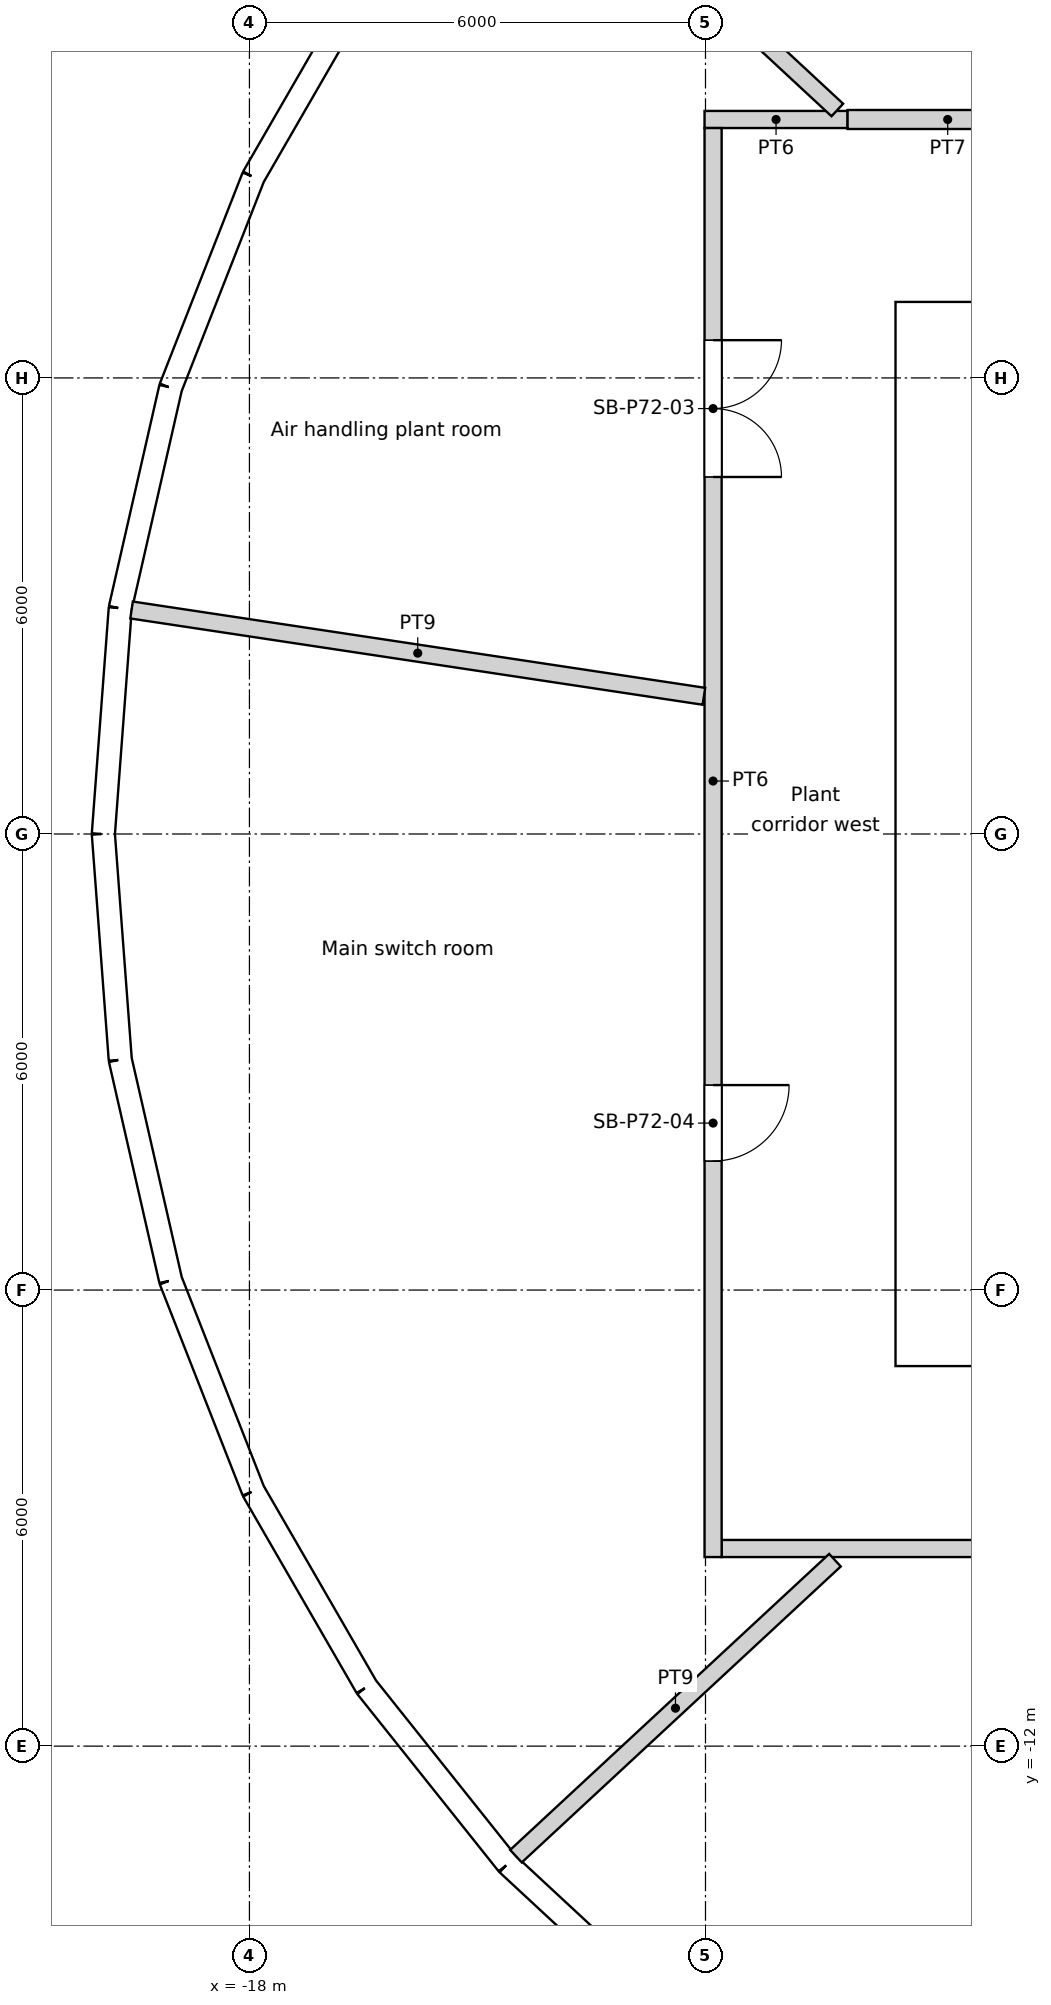
"""IFC4 building model, lengths in metres.
Left out: names, types, materials, properties, quantities, classifications, styles, units other than length and angle.
Written with IfcOpenShell. Run it as: python <this file> out.ifc"""

import sys

from ifc_helpers import new_model, si_unit, direction, frame, frame_2d, origin, origin_2d, place, context, subcontext, project, spatial, rectangle, circle, extrude, element, fill, save


model = new_model("IFC4")
c1 = context("Model", 3, precision=1e-05, world=origin(), true_north=direction((0.0, 1.0)))
c2 = subcontext(c1, "Body", "Model", "MODEL_VIEW")
j1 = project(units=[si_unit("LENGTHUNIT", "METRE"), si_unit("PLANEANGLEUNIT", "RADIAN")], contexts=[c1])
p1 = place(None, origin())
s1 = spatial("IfcSite", under=j1, at=p1, CompositionType="ELEMENT")
p2 = place(p1, origin())
s2 = spatial("IfcBuilding", under=s1, at=p2, CompositionType="ELEMENT")
p3 = place(p2, frame((0.0, 0.0, 277.8)))
s3 = spatial("IfcBuildingStorey", under=s2, at=p3, CompositionType="ELEMENT", Elevation=277.8)
for number, where, z_axis, x_axis in (
    (1, (-16.958, 8.167, 0.0), (0.0, 0.0, 1.0), (1.0, 0.0, 0.0)),
    (2, (-18.612, 2.805, 0.0), (0.0, 0.0, 1.0), (1.0, 0.0, 0.0)),
    (3, (-18.612, -2.805, 0.0), (0.0, 0.0, 1.0), (1.0, 0.0, 0.0)),
    (4, (-16.958, -8.167, 0.0), (0.0, 0.0, 1.0), (1.0, 0.0, 0.0)),
    (5, (-13.798, -12.802, 0.0), (0.0, 0.0, 1.0), (1.0, 0.0, 0.0)),
):
    element("IfcColumn", number, at=place(p3, frame(where, z_axis=z_axis, x_axis=x_axis)), inside=s3, PredefinedType="COLUMN", context=c2, shape_type="SweptSolid", body=[
        extrude(circle(Radius=0.55, at=origin_2d()), origin(), (0.0, 0.0, 1.0), 6.0),
    ])
p4 = place(p3, frame((-16.46, 11.222, 0.0), z_axis=(0.0, 0.0, 1.0), x_axis=(-0.500001626982, -0.866024464444, 0.0)))
e6 = element("IfcWall", 6, at=p4, inside=s3, PredefinedType="SOLIDWALL", context=c2, shape_type="SweptSolid", body=[
    extrude(rectangle(XDim=2.978, YDim=0.3, at=frame_2d((1.489, 0.0))), origin(), (0.0, 0.0, 1.0), 5.65),
])
p5 = place(p4, frame((1.489, 0.0, 1.825)))
e7 = element("IfcOpeningElement", 7, at=p5, cuts=e6, PredefinedType="OPENING", context=c2, shape_type="SweptSolid", body=[
    extrude(circle(Radius=1.2, at=origin_2d()), frame((0.0, 0.16, 0.0), z_axis=(0.0, -1.0, 0.0), x_axis=(1.0, 0.0, 0.0)), (0.0, 0.0, 1.0), 0.32),
])
p6 = place(p3, frame((-17.949, 8.644, 0.0), z_axis=(0.0, 0.0, 1.0), x_axis=(-0.365289571566, -0.930893940739, 0.0)))
e8 = element("IfcWall", 8, at=p6, inside=s3, PredefinedType="SOLIDWALL", context=c2, shape_type="SweptSolid", body=[
    extrude(rectangle(XDim=2.978, YDim=0.3, at=frame_2d((1.489, 0.0))), origin(), (0.0, 0.0, 1.0), 5.65),
])
p7 = place(p6, frame((1.489, 0.0, 1.825)))
e9 = element("IfcOpeningElement", 9, at=p7, cuts=e8, PredefinedType="OPENING", context=c2, shape_type="SweptSolid", body=[
    extrude(circle(Radius=1.2, at=origin_2d()), frame((0.0, 0.16, 0.0), z_axis=(0.0, -1.0, 0.0), x_axis=(1.0, 0.0, 0.0)), (0.0, 0.0, 1.0), 0.32),
])
p8 = place(p3, frame((-19.037, 5.872, 0.0), z_axis=(0.0, 0.0, 1.0), x_axis=(-0.222535358937, -0.974924619662, 0.0)))
e10 = element("IfcWall", 10, at=p8, inside=s3, PredefinedType="SOLIDWALL", context=c2, shape_type="SweptSolid", body=[
    extrude(rectangle(XDim=2.978, YDim=0.3, at=frame_2d((1.489, 0.0))), origin(), (0.0, 0.0, 1.0), 5.2),
])
p9 = place(p8, frame((1.489, 0.0, 1.825)))
e11 = element("IfcOpeningElement", 11, at=p9, cuts=e10, PredefinedType="OPENING", context=c2, shape_type="SweptSolid", body=[
    extrude(circle(Radius=1.2, at=origin_2d()), frame((0.0, 0.16, 0.0), z_axis=(0.0, -1.0, 0.0), x_axis=(1.0, 0.0, 0.0)), (0.0, 0.0, 1.0), 0.32),
])
p10 = place(p3, frame((-19.699, 2.969, 0.0), z_axis=(0.0, 0.0, 1.0), x_axis=(-0.074777718064, -0.997200227076, 0.0)))
e12 = element("IfcWall", 12, at=p10, inside=s3, PredefinedType="SOLIDWALL", context=c2, shape_type="SweptSolid", body=[
    extrude(rectangle(XDim=2.978, YDim=0.3, at=frame_2d((1.489, 0.0))), origin(), (0.0, 0.0, 1.0), 5.65),
])
p11 = place(p10, frame((1.489, 0.0, 1.825)))
e13 = element("IfcOpeningElement", 13, at=p11, cuts=e12, PredefinedType="OPENING", context=c2, shape_type="SweptSolid", body=[
    extrude(circle(Radius=1.2, at=origin_2d()), frame((0.0, 0.16, 0.0), z_axis=(0.0, -1.0, 0.0), x_axis=(1.0, 0.0, 0.0)), (0.0, 0.0, 1.0), 0.32),
])
p12 = place(p3, frame((-19.922, 0.0, 0.0), z_axis=(0.0, 0.0, 1.0), x_axis=(0.074777718064, -0.997200227076, 0.0)))
e14 = element("IfcWall", 14, at=p12, inside=s3, PredefinedType="SOLIDWALL", context=c2, shape_type="SweptSolid", body=[
    extrude(rectangle(XDim=2.978, YDim=0.3, at=frame_2d((1.489, 0.0))), origin(), (0.0, 0.0, 1.0), 5.65),
])
p13 = place(p12, frame((1.489, 0.0, 1.825)))
e15 = element("IfcOpeningElement", 15, at=p13, cuts=e14, PredefinedType="OPENING", context=c2, shape_type="SweptSolid", body=[
    extrude(circle(Radius=1.2, at=origin_2d()), frame((0.0, 0.16, 0.0), z_axis=(0.0, -1.0, 0.0), x_axis=(1.0, 0.0, 0.0)), (0.0, 0.0, 1.0), 0.32),
])
p14 = place(p3, frame((-19.699, -2.969, 0.0), z_axis=(0.0, 0.0, 1.0), x_axis=(0.222535358937, -0.974924619662, 0.0)))
e16 = element("IfcWall", 16, at=p14, inside=s3, PredefinedType="SOLIDWALL", context=c2, shape_type="SweptSolid", body=[
    extrude(rectangle(XDim=2.978, YDim=0.3, at=frame_2d((1.489, 0.0))), origin(), (0.0, 0.0, 1.0), 5.2),
])
p15 = place(p14, frame((1.489, 0.0, 1.825)))
e17 = element("IfcOpeningElement", 17, at=p15, cuts=e16, PredefinedType="OPENING", context=c2, shape_type="SweptSolid", body=[
    extrude(circle(Radius=1.2, at=origin_2d()), frame((0.0, 0.16, 0.0), z_axis=(0.0, -1.0, 0.0), x_axis=(1.0, 0.0, 0.0)), (0.0, 0.0, 1.0), 0.32),
])
p16 = place(p3, frame((-19.037, -5.872, 0.0), z_axis=(0.0, 0.0, 1.0), x_axis=(0.365289571566, -0.930893940739, 0.0)))
e18 = element("IfcWall", 18, at=p16, inside=s3, PredefinedType="SOLIDWALL", context=c2, shape_type="SweptSolid", body=[
    extrude(rectangle(XDim=2.978, YDim=0.3, at=frame_2d((1.489, 0.0))), origin(), (0.0, 0.0, 1.0), 5.65),
])
p17 = place(p16, frame((1.489, 0.0, 1.825)))
e19 = element("IfcOpeningElement", 19, at=p17, cuts=e18, PredefinedType="OPENING", context=c2, shape_type="SweptSolid", body=[
    extrude(circle(Radius=1.2, at=origin_2d()), frame((0.0, 0.16, 0.0), z_axis=(0.0, -1.0, 0.0), x_axis=(1.0, 0.0, 0.0)), (0.0, 0.0, 1.0), 0.32),
])
p18 = place(p3, frame((-17.949, -8.644, 0.0), z_axis=(0.0, 0.0, 1.0), x_axis=(0.500001626982, -0.866024464444, 0.0)))
e20 = element("IfcWall", 20, at=p18, inside=s3, PredefinedType="SOLIDWALL", context=c2, shape_type="SweptSolid", body=[
    extrude(rectangle(XDim=2.978, YDim=0.3, at=frame_2d((1.489, 0.0))), origin(), (0.0, 0.0, 1.0), 5.65),
])
p19 = place(p18, frame((1.489, 0.0, 1.825)))
e21 = element("IfcOpeningElement", 21, at=p19, cuts=e20, PredefinedType="OPENING", context=c2, shape_type="SweptSolid", body=[
    extrude(circle(Radius=1.2, at=origin_2d()), frame((0.0, 0.16, 0.0), z_axis=(0.0, -1.0, 0.0), x_axis=(1.0, 0.0, 0.0)), (0.0, 0.0, 1.0), 0.32),
])
p20 = place(p3, frame((-16.46, -11.222, 0.0), z_axis=(0.0, 0.0, 1.0), x_axis=(0.623494374707, -0.781827835722, 0.0)))
e22 = element("IfcWall", 22, at=p20, inside=s3, PredefinedType="SOLIDWALL", context=c2, shape_type="SweptSolid", body=[
    extrude(rectangle(XDim=2.978, YDim=0.3, at=frame_2d((1.489, 0.0))), origin(), (0.0, 0.0, 1.0), 5.2),
])
p21 = place(p20, frame((1.489, 0.0, 1.825)))
e23 = element("IfcOpeningElement", 23, at=p21, cuts=e22, PredefinedType="OPENING", context=c2, shape_type="SweptSolid", body=[
    extrude(circle(Radius=1.2, at=origin_2d()), frame((0.0, 0.16, 0.0), z_axis=(0.0, -1.0, 0.0), x_axis=(1.0, 0.0, 0.0)), (0.0, 0.0, 1.0), 0.32),
])
p22 = place(p3, frame((-14.604, -13.55, 0.0), z_axis=(0.0, 0.0, 1.0), x_axis=(0.733056277766, -0.68016798927, 0.0)))
e24 = element("IfcWall", 24, at=p22, inside=s3, PredefinedType="SOLIDWALL", context=c2, shape_type="SweptSolid", body=[
    extrude(rectangle(XDim=2.978, YDim=0.3, at=frame_2d((1.489, 0.0))), origin(), (0.0, 0.0, 1.0), 5.65),
])
p23 = place(p22, frame((1.489, 0.0, 1.825)))
e25 = element("IfcOpeningElement", 25, at=p23, cuts=e24, PredefinedType="OPENING", context=c2, shape_type="SweptSolid", body=[
    extrude(circle(Radius=1.2, at=origin_2d()), frame((0.0, 0.16, 0.0), z_axis=(0.0, -1.0, 0.0), x_axis=(1.0, 0.0, 0.0)), (0.0, 0.0, 1.0), 0.32),
])
p24 = place(p3, frame((-9.5, -6.7, 0.0), z_axis=(0.0, 0.0, 1.0), x_axis=(1.0, 0.0, 0.0)))
e26 = element("IfcWall", 26, at=p24, inside=s3, PredefinedType="SOLIDWALL", context=c2, shape_type="SweptSolid", body=[
    extrude(rectangle(XDim=19.0, YDim=0.6, at=frame_2d((9.5, 0.0))), origin(), (0.0, 0.0, 1.0), 6.0),
])
p25 = place(p24, frame((10.4, 0.0, 0.0)))
e27 = element("IfcOpeningElement", 27, at=p25, cuts=e26, PredefinedType="OPENING", context=c2, shape_type="SweptSolid", body=[
    extrude(rectangle(XDim=1.0, YDim=2.1, at=frame_2d((0.5, 1.05))), frame((0.0, 0.3, 0.0), z_axis=(0.0, -1.0, 0.0), x_axis=(1.0, 0.0, 0.0)), (0.0, 0.0, 1.0), 0.6),
])
p26 = place(p24, frame((5.35, 0.0, 0.0)))
e28 = element("IfcOpeningElement", 28, at=p26, cuts=e26, PredefinedType="OPENING", context=c2, shape_type="SweptSolid", body=[
    extrude(rectangle(XDim=1.7, YDim=2.1, at=frame_2d((0.85, 1.05))), frame((0.0, 0.3, 0.0), z_axis=(0.0, -1.0, 0.0), x_axis=(1.0, 0.0, 0.0)), (0.0, 0.0, 1.0), 0.6),
])
p27 = place(p24, frame((11.95, 0.0, 0.0)))
e29 = element("IfcOpeningElement", 29, at=p27, cuts=e26, PredefinedType="OPENING", context=c2, shape_type="SweptSolid", body=[
    extrude(rectangle(XDim=1.7, YDim=2.1, at=frame_2d((0.85, 1.05))), frame((0.0, 0.3, 0.0), z_axis=(0.0, -1.0, 0.0), x_axis=(1.0, 0.0, 0.0)), (0.0, 0.0, 1.0), 0.6),
])
p28 = place(p3, frame((-9.5, 6.7, 0.0), z_axis=(0.0, 0.0, 1.0), x_axis=(1.0, 0.0, 0.0)))
e30 = element("IfcWall", 30, at=p28, inside=s3, PredefinedType="SOLIDWALL", context=c2, shape_type="SweptSolid", body=[
    extrude(rectangle(XDim=19.0, YDim=0.6, at=frame_2d((9.5, 0.0))), origin(), (0.0, 0.0, 1.0), 6.0),
])
p29 = place(p28, frame((5.35, 0.0, 0.0)))
e31 = element("IfcOpeningElement", 31, at=p29, cuts=e30, PredefinedType="OPENING", context=c2, shape_type="SweptSolid", body=[
    extrude(rectangle(XDim=1.7, YDim=2.1, at=frame_2d((0.85, 1.05))), frame((0.0, 0.3, 0.0), z_axis=(0.0, -1.0, 0.0), x_axis=(1.0, 0.0, 0.0)), (0.0, 0.0, 1.0), 0.6),
])
p30 = place(p3, frame((-9.2, -6.4, 0.0), z_axis=(0.0, 0.0, 1.0), x_axis=(0.0, 1.0, 0.0)))
e32 = element("IfcWall", 32, at=p30, inside=s3, PredefinedType="SOLIDWALL", context=c2, shape_type="SweptSolid", body=[
    extrude(rectangle(XDim=12.8, YDim=0.6, at=frame_2d((6.4, 0.0))), origin(), (0.0, 0.0, 1.0), 6.0),
])
p31 = place(p3, frame((-8.9, -3.1, 0.0), z_axis=(0.0, 0.0, 1.0), x_axis=(1.0, 0.0, 0.0)))
e33 = element("IfcWall", 33, at=p31, inside=s3, PredefinedType="SOLIDWALL", context=c2, shape_type="SweptSolid", body=[
    extrude(rectangle(XDim=9.6, YDim=0.3, at=frame_2d((4.8, 0.0))), origin(), (0.0, 0.0, 1.0), 5.65),
])
p32 = place(p31, frame((4.75, 0.0, 0.0)))
e34 = element("IfcOpeningElement", 34, at=p32, cuts=e33, PredefinedType="OPENING", context=c2, shape_type="SweptSolid", body=[
    extrude(rectangle(XDim=1.7, YDim=2.1, at=frame_2d((0.85, 1.05))), frame((0.0, 0.15, 0.0), z_axis=(0.0, -1.0, 0.0), x_axis=(1.0, 0.0, 0.0)), (0.0, 0.0, 1.0), 0.3),
])
p33 = place(p3, frame((-8.9, 3.1, 0.0), z_axis=(0.0, 0.0, 1.0), x_axis=(1.0, 0.0, 0.0)))
e35 = element("IfcWall", 35, at=p33, inside=s3, PredefinedType="SOLIDWALL", context=c2, shape_type="SweptSolid", body=[
    extrude(rectangle(XDim=4.55, YDim=0.3, at=frame_2d((2.275, 0.0))), origin(), (0.0, 0.0, 1.0), 5.65),
])
p34 = place(p3, frame((-8.9, 0.0, 0.0), z_axis=(0.0, 0.0, 1.0), x_axis=(1.0, 0.0, 0.0)))
e36 = element("IfcWall", 36, at=p34, inside=s3, PredefinedType="SOLIDWALL", context=c2, shape_type="SweptSolid", body=[
    extrude(rectangle(XDim=3.0, YDim=0.3, at=frame_2d((1.5, 0.0))), origin(), (0.0, 0.0, 1.0), 5.65),
])
p35 = place(p3, frame((-19.551, 2.947, 0.0), z_axis=(0.0, 0.0, 1.0), x_axis=(0.988828618492, -0.14905691279, 0.0)))
e37 = element("IfcWall", 37, at=p35, inside=s3, PredefinedType="PARTITIONING", context=c2, shape_type="SweptSolid", body=[
    extrude(rectangle(XDim=7.615, YDim=0.225, at=frame_2d((3.807, 0.0))), origin(), (0.0, 0.0, 1.0), 2.7),
])
p36 = place(p3, frame((-14.493, -13.448, 0.0), z_axis=(0.0, 0.0, 1.0), x_axis=(0.733050106305, 0.680174640549, 0.0)))
e38 = element("IfcWall", 38, at=p36, inside=s3, PredefinedType="PARTITIONING", context=c2, shape_type="SweptSolid", body=[
    extrude(rectangle(XDim=5.725, YDim=0.225, at=frame_2d((2.863, 0.0))), origin(), (0.0, 0.0, 1.0), 2.7),
])
p37 = place(p3, frame((-14.493, 13.448, 0.0), z_axis=(0.0, 0.0, 1.0), x_axis=(0.733046716658, -0.680178293682, 0.0)))
e39 = element("IfcWall", 39, at=p37, inside=s3, PredefinedType="PARTITIONING", context=c2, shape_type="SweptSolid", body=[
    extrude(rectangle(XDim=5.768, YDim=0.225, at=frame_2d((2.884, 0.0))), origin(), (0.0, 0.0, 1.0), 2.7),
])
p38 = place(p3, frame((-11.788, -9.4, 0.0), z_axis=(0.0, 0.0, 1.0), x_axis=(1.0, 0.0, 0.0)))
e40 = element("IfcWall", 40, at=p38, inside=s3, PredefinedType="PARTITIONING", context=c2, shape_type="SweptSolid", body=[
    extrude(rectangle(XDim=23.575, YDim=0.225, at=frame_2d((11.788, 0.0))), origin(), (0.0, 0.0, 1.0), 5.65),
])
p39 = place(p38, frame((6.89, 0.0, 0.0)))
e41 = element("IfcOpeningElement", 41, at=p39, cuts=e40, PredefinedType="OPENING", context=c2, shape_type="SweptSolid", body=[
    extrude(rectangle(XDim=1.0, YDim=2.1, at=frame_2d((0.5, 1.05))), frame((0.0, 0.113, 0.0), z_axis=(0.0, -1.0, 0.0), x_axis=(1.0, 0.0, 0.0)), (0.0, 0.0, 1.0), 0.225),
])
p40 = place(p38, frame((15.388, 0.0, 0.0)))
e42 = element("IfcOpeningElement", 42, at=p40, cuts=e40, PredefinedType="OPENING", context=c2, shape_type="SweptSolid", body=[
    extrude(rectangle(XDim=1.0, YDim=2.1, at=frame_2d((0.5, 1.05))), frame((0.0, 0.113, 0.0), z_axis=(0.0, -1.0, 0.0), x_axis=(1.0, 0.0, 0.0)), (0.0, 0.0, 1.0), 0.225),
])
p41 = place(p3, frame((-11.9, 9.288, 0.0), z_axis=(0.0, 0.0, 1.0), x_axis=(0.0, -1.0, 0.0)))
e43 = element("IfcWall", 43, at=p41, inside=s3, PredefinedType="PARTITIONING", context=c2, shape_type="SweptSolid", body=[
    extrude(rectangle(XDim=18.8, YDim=0.225, at=frame_2d((9.4, 0.0))), origin(), (0.0, 0.0, 1.0), 5.65),
])
p42 = place(p41, frame((2.791, 0.0, 0.0)))
e44 = element("IfcOpeningElement", 44, at=p42, cuts=e43, PredefinedType="OPENING", context=c2, shape_type="SweptSolid", body=[
    extrude(rectangle(XDim=1.8, YDim=2.4, at=frame_2d((0.9, 1.2))), frame((0.0, 0.113, 0.0), z_axis=(0.0, -1.0, 0.0), x_axis=(1.0, 0.0, 0.0)), (0.0, 0.0, 1.0), 0.225),
])
p43 = place(p41, frame((12.591, 0.0, 0.0)))
e45 = element("IfcOpeningElement", 45, at=p43, cuts=e43, PredefinedType="OPENING", context=c2, shape_type="SweptSolid", body=[
    extrude(rectangle(XDim=1.0, YDim=2.1, at=frame_2d((0.5, 1.05))), frame((0.0, 0.113, 0.0), z_axis=(0.0, -1.0, 0.0), x_axis=(1.0, 0.0, 0.0)), (0.0, 0.0, 1.0), 0.225),
])
p44 = place(p3, frame((-10.131, 9.4, 0.0), z_axis=(0.0, 0.0, 1.0), x_axis=(-1.0, 0.0, 0.0)))
e46 = element("IfcWall", 46, at=p44, inside=s3, PredefinedType="PARTITIONING", context=c2, shape_type="SweptSolid", body=[
    extrude(rectangle(XDim=1.882, YDim=0.225, at=frame_2d((0.941, 0.0))), origin(), (0.0, 0.0, 1.0), 5.65),
])
p45 = place(p3, frame((-7.496, 9.4, 0.0), z_axis=(0.0, 0.0, 1.0), x_axis=(-1.0, 0.0, 0.0)))
e47 = element("IfcWall", 47, at=p45, inside=s3, PredefinedType="PARTITIONING", context=c2, shape_type="SweptSolid", body=[
    extrude(rectangle(XDim=2.635, YDim=0.25, at=frame_2d((1.317, 0.0))), origin(), (0.0, 0.0, 1.0), 5.65),
])
p46 = place(p5, origin())
e48 = element("IfcWindow", 48, at=p46, inside=s3, PartitioningType="SINGLE_PANEL", PredefinedType="WINDOW", context=c2, shape_type="SweptSolid", body=[
    extrude(circle(Radius=1.2, at=origin_2d()), frame((0.0, 0.12, 0.0), z_axis=(0.0, -1.0, 0.0), x_axis=(1.0, 0.0, 0.0)), (0.0, 0.0, 1.0), 0.1),
])
fill(e7, e48)
p47 = place(p7, origin())
e49 = element("IfcWindow", 49, at=p47, inside=s3, PartitioningType="SINGLE_PANEL", PredefinedType="WINDOW", context=c2, shape_type="SweptSolid", body=[
    extrude(circle(Radius=1.2, at=origin_2d()), frame((0.0, 0.12, 0.0), z_axis=(0.0, -1.0, 0.0), x_axis=(1.0, 0.0, 0.0)), (0.0, 0.0, 1.0), 0.1),
])
fill(e9, e49)
p48 = place(p9, origin())
e50 = element("IfcWindow", 50, at=p48, inside=s3, PartitioningType="SINGLE_PANEL", PredefinedType="WINDOW", context=c2, shape_type="SweptSolid", body=[
    extrude(circle(Radius=1.2, at=origin_2d()), frame((0.0, 0.12, 0.0), z_axis=(0.0, -1.0, 0.0), x_axis=(1.0, 0.0, 0.0)), (0.0, 0.0, 1.0), 0.1),
])
fill(e11, e50)
p49 = place(p11, origin())
e51 = element("IfcWindow", 51, at=p49, inside=s3, PartitioningType="SINGLE_PANEL", PredefinedType="WINDOW", context=c2, shape_type="SweptSolid", body=[
    extrude(circle(Radius=1.2, at=origin_2d()), frame((0.0, 0.12, 0.0), z_axis=(0.0, -1.0, 0.0), x_axis=(1.0, 0.0, 0.0)), (0.0, 0.0, 1.0), 0.1),
])
fill(e13, e51)
p50 = place(p13, origin())
e52 = element("IfcWindow", 52, at=p50, inside=s3, PartitioningType="SINGLE_PANEL", PredefinedType="WINDOW", context=c2, shape_type="SweptSolid", body=[
    extrude(circle(Radius=1.2, at=origin_2d()), frame((0.0, 0.12, 0.0), z_axis=(0.0, -1.0, 0.0), x_axis=(1.0, 0.0, 0.0)), (0.0, 0.0, 1.0), 0.1),
])
fill(e15, e52)
p51 = place(p15, origin())
e53 = element("IfcWindow", 53, at=p51, inside=s3, PartitioningType="SINGLE_PANEL", PredefinedType="WINDOW", context=c2, shape_type="SweptSolid", body=[
    extrude(circle(Radius=1.2, at=origin_2d()), frame((0.0, 0.12, 0.0), z_axis=(0.0, -1.0, 0.0), x_axis=(1.0, 0.0, 0.0)), (0.0, 0.0, 1.0), 0.1),
])
fill(e17, e53)
p52 = place(p17, origin())
e54 = element("IfcWindow", 54, at=p52, inside=s3, PartitioningType="SINGLE_PANEL", PredefinedType="WINDOW", context=c2, shape_type="SweptSolid", body=[
    extrude(circle(Radius=1.2, at=origin_2d()), frame((0.0, 0.12, 0.0), z_axis=(0.0, -1.0, 0.0), x_axis=(1.0, 0.0, 0.0)), (0.0, 0.0, 1.0), 0.1),
])
fill(e19, e54)
p53 = place(p19, origin())
e55 = element("IfcWindow", 55, at=p53, inside=s3, PartitioningType="SINGLE_PANEL", PredefinedType="WINDOW", context=c2, shape_type="SweptSolid", body=[
    extrude(circle(Radius=1.2, at=origin_2d()), frame((0.0, 0.12, 0.0), z_axis=(0.0, -1.0, 0.0), x_axis=(1.0, 0.0, 0.0)), (0.0, 0.0, 1.0), 0.1),
])
fill(e21, e55)
p54 = place(p21, origin())
e56 = element("IfcWindow", 56, at=p54, inside=s3, PartitioningType="SINGLE_PANEL", PredefinedType="WINDOW", context=c2, shape_type="SweptSolid", body=[
    extrude(circle(Radius=1.2, at=origin_2d()), frame((0.0, 0.12, 0.0), z_axis=(0.0, -1.0, 0.0), x_axis=(1.0, 0.0, 0.0)), (0.0, 0.0, 1.0), 0.1),
])
fill(e23, e56)
p55 = place(p23, origin())
e57 = element("IfcWindow", 57, at=p55, inside=s3, PartitioningType="SINGLE_PANEL", PredefinedType="WINDOW", context=c2, shape_type="SweptSolid", body=[
    extrude(circle(Radius=1.2, at=origin_2d()), frame((0.0, 0.12, 0.0), z_axis=(0.0, -1.0, 0.0), x_axis=(1.0, 0.0, 0.0)), (0.0, 0.0, 1.0), 0.1),
])
fill(e25, e57)
p56 = place(p42, origin())
e58 = element("IfcDoor", 58, at=p56, inside=s3, OperationType="DOUBLE_DOOR_SINGLE_SWING", PredefinedType="DOOR", context=c2, shape_type="SweptSolid", body=[
    extrude(rectangle(XDim=1.8, YDim=2.4, at=frame_2d((0.9, 1.2))), frame((0.0, 0.025, 0.0), z_axis=(0.0, -1.0, 0.0), x_axis=(1.0, 0.0, 0.0)), (0.0, 0.0, 1.0), 0.05),
])
fill(e44, e58)
p57 = place(p43, origin())
e59 = element("IfcDoor", 59, at=p57, inside=s3, OperationType="SINGLE_SWING_LEFT", PredefinedType="DOOR", context=c2, shape_type="SweptSolid", body=[
    extrude(rectangle(XDim=1.0, YDim=2.1, at=frame_2d((0.5, 1.05))), frame((0.0, 0.025, 0.0), z_axis=(0.0, -1.0, 0.0), x_axis=(1.0, 0.0, 0.0)), (0.0, 0.0, 1.0), 0.05),
])
fill(e45, e59)
save(model, sys.argv[1])
